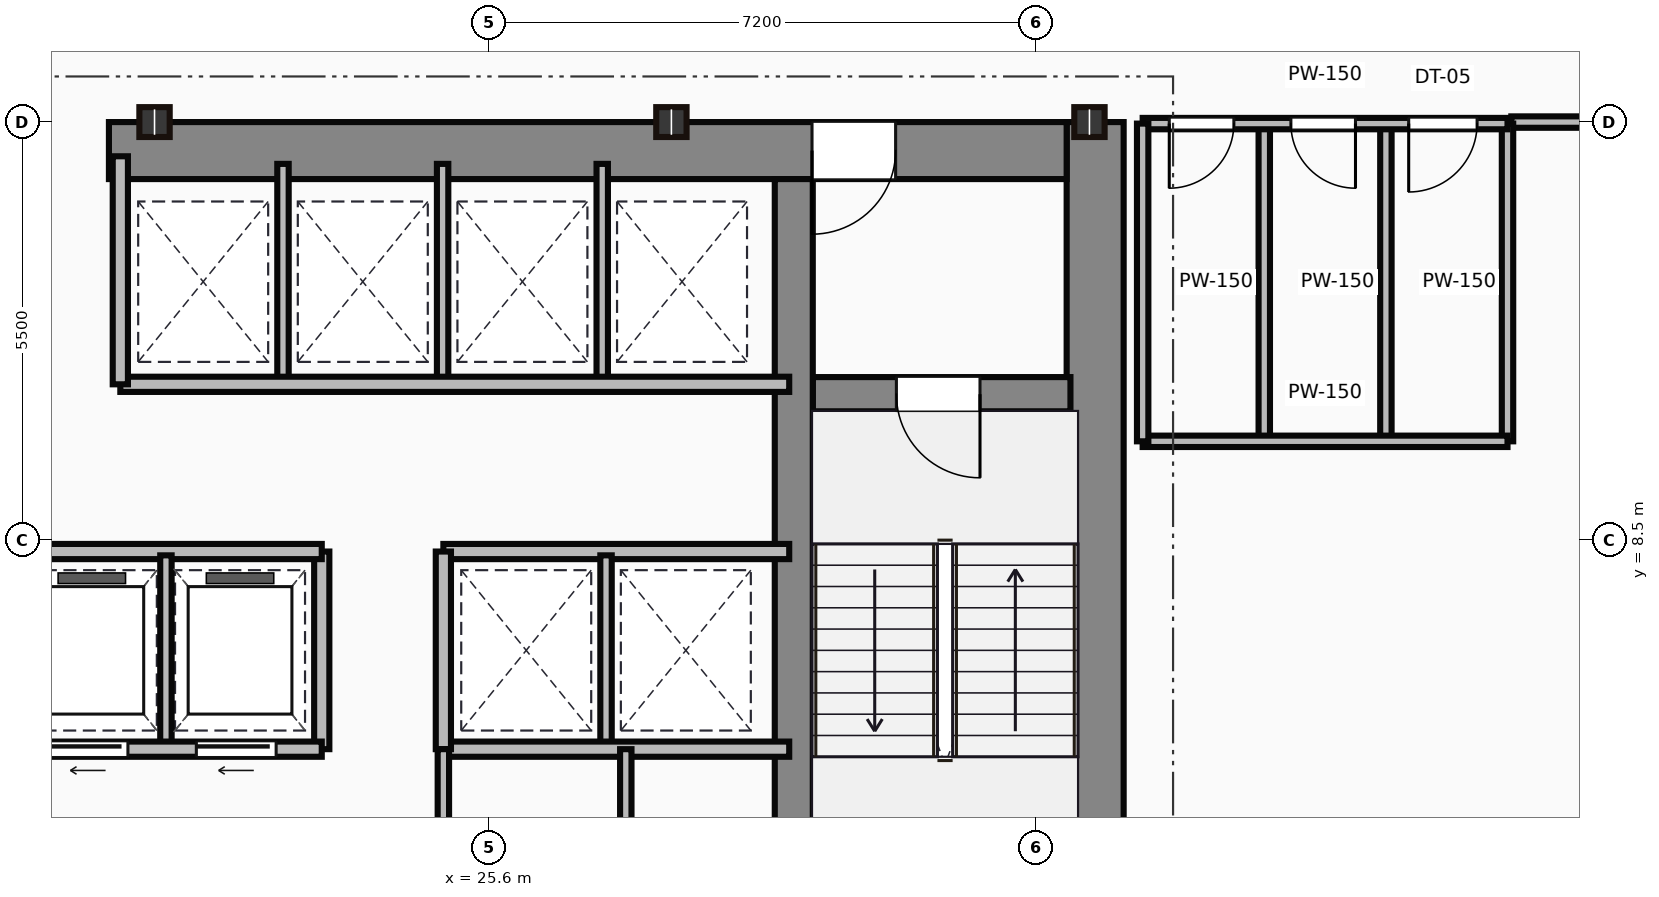
"""IFC4 building model, lengths in metres.
Left out: names, types, materials, properties, quantities, classifications, styles, units other than length and angle.
Written with IfcOpenShell. Run it as: python <this file> out.ifc"""

import sys

from ifc_helpers import new_model, si_unit, direction, frame, frame_2d, origin, origin_2d, place, context, subcontext, project, spatial, rectangle, i_section, extrude, source, transform, mapped, element, fill, save


model = new_model("IFC4")
c1 = context("Model", 3, precision=1e-05, world=origin(), true_north=direction((0.0, 1.0)))
c2 = subcontext(c1, "Body", "Model", "MODEL_VIEW")
j1 = project(units=[si_unit("LENGTHUNIT", "METRE"), si_unit("PLANEANGLEUNIT", "RADIAN")], contexts=[c1])
p1 = place(None, origin())
s1 = spatial("IfcSite", under=j1, at=p1, CompositionType="ELEMENT")
p2 = place(p1, origin())
s2 = spatial("IfcBuilding", under=s1, at=p2, CompositionType="ELEMENT")
p3 = place(p2, frame((0.0, 0.0, 99.6)))
s3 = spatial("IfcBuildingStorey", under=s2, at=p3, CompositionType="ELEMENT", Elevation=99.6)
m1 = source(origin(), c2, "Body", "SweptSolid", [
    extrude(rectangle(XDim=13.1, YDim=0.75, at=frame_2d((6.55, 0.0))), origin(), (0.0, 0.0, 1.0), 3.65),
])
p4 = place(p3, frame((33.575, 0.9, 0.0), z_axis=(0.0, 0.0, 1.0), x_axis=(0.0, 1.0, 0.0)))
e1 = element("IfcWall", 1, at=p4, inside=s3, PredefinedType="SHEAR", context=c2, shape_type="MappedRepresentation", body=[
    mapped(m1, transform((0.0, 0.0, 0.0))),
])
m2 = source(origin(), c2, "Body", "SweptSolid", [
    extrude(rectangle(XDim=12.6, YDim=0.75, at=frame_2d((6.3, 0.0))), origin(), (0.0, 0.0, 1.0), 3.65),
])
p5 = place(p3, frame((20.6, 13.625, 0.0), z_axis=(0.0, 0.0, 1.0), x_axis=(1.0, 0.0, 0.0)))
e2 = element("IfcWall", 2, at=p5, inside=s3, PredefinedType="SHEAR", context=c2, shape_type="MappedRepresentation", body=[
    mapped(m2, transform((0.0, 0.0, 0.0))),
])
p6 = place(p5, frame((9.25, 0.0, 0.0)))
e3 = element("IfcOpeningElement", 3, at=p6, cuts=e2, PredefinedType="OPENING", context=c2, shape_type="SweptSolid", body=[
    extrude(rectangle(XDim=1.1, YDim=2.15, at=frame_2d((0.55, 1.075))), frame((0.0, 0.385, 0.0), z_axis=(0.0, -1.0, 0.0), x_axis=(1.0, 0.0, 0.0)), (0.0, 0.0, 1.0), 0.77),
])
m3 = source(origin(), c2, "Body", "SweptSolid", [
    extrude(rectangle(XDim=12.35, YDim=0.5, at=frame_2d((6.175, 0.0))), origin(), (0.0, 0.0, 1.0), 3.65),
])
p7 = place(p3, frame((29.61, 0.9, 0.0), z_axis=(0.0, 0.0, 1.0), x_axis=(0.0, 1.0, 0.0)))
e4 = element("IfcWall", 4, at=p7, inside=s3, PredefinedType="SHEAR", context=c2, shape_type="MappedRepresentation", body=[
    mapped(m3, transform((0.0, 0.0, 0.0))),
])
m4 = source(origin(), c2, "Body", "SweptSolid", [
    extrude(rectangle(XDim=3.39, YDim=0.45, at=frame_2d((1.695, 0.0))), origin(), (0.0, 0.0, 1.0), 3.65),
])
p8 = place(p3, frame((29.86, 10.42, 0.0), z_axis=(0.0, 0.0, 1.0), x_axis=(1.0, 0.0, 0.0)))
e5 = element("IfcWall", 5, at=p8, inside=s3, PredefinedType="SHEAR", context=c2, shape_type="MappedRepresentation", body=[
    mapped(m4, transform((0.0, 0.0, 0.0))),
])
p9 = place(p8, frame((1.1, 0.0, 0.0)))
e6 = element("IfcOpeningElement", 6, at=p9, cuts=e5, PredefinedType="OPENING", context=c2, shape_type="SweptSolid", body=[
    extrude(rectangle(XDim=1.1, YDim=2.15, at=frame_2d((0.55, 1.075))), frame((0.0, 0.235, 0.0), z_axis=(0.0, -1.0, 0.0), x_axis=(1.0, 0.0, 0.0)), (0.0, 0.0, 1.0), 0.47),
])
m5 = source(origin(), c2, "Body", "SweptSolid", [
    extrude(i_section(OverallWidth=0.399, OverallDepth=0.393, WebThickness=0.023, FlangeThickness=0.037, at=origin_2d()), origin(), (0.0, 0.0, 1.0), 3.65),
])
for number, where, z_axis, x_axis in (
    (7, (21.2, 14.0, 0.0), (0.0, 0.0, 1.0), (1.0, 0.0, 0.0)),
    (8, (28.0, 14.0, 0.0), (0.0, 0.0, 1.0), (1.0, 0.0, 0.0)),
    (9, (33.5, 14.0, 0.0), (0.0, 0.0, 1.0), (1.0, 0.0, 0.0)),
):
    element("IfcColumn", number, at=place(p3, frame(where, z_axis=z_axis, x_axis=x_axis)), inside=s3, PredefinedType="COLUMN", context=c2, shape_type="MappedRepresentation", body=[
        mapped(m5, transform((0.0, 0.0, 0.0))),
    ])
m6 = source(origin(), c2, "Body", "SweptSolid", [
    extrude(rectangle(XDim=11.85, YDim=0.2, at=frame_2d((5.925, 0.0))), origin(), (0.0, 0.0, 1.0), 3.4),
])
p10 = place(p3, frame((11.55, 5.75, 0.0), z_axis=(0.0, 0.0, 1.0), x_axis=(1.0, 0.0, 0.0)))
e10 = element("IfcWall", 10, at=p10, inside=s3, PredefinedType="PARTITIONING", context=c2, shape_type="MappedRepresentation", body=[
    mapped(m6, transform((0.0, 0.0, 0.0))),
])
p11 = place(p10, frame((0.45, 0.0, 0.0)))
e11 = element("IfcOpeningElement", 11, at=p11, cuts=e10, PredefinedType="OPENING", context=c2, shape_type="SweptSolid", body=[
    extrude(rectangle(XDim=1.05, YDim=2.15, at=frame_2d((0.525, 1.075))), frame((0.0, 0.11, 0.0), z_axis=(0.0, -1.0, 0.0), x_axis=(1.0, 0.0, 0.0)), (0.0, 0.0, 1.0), 0.22),
])
p12 = place(p10, frame((2.4, 0.0, 0.0)))
e12 = element("IfcOpeningElement", 12, at=p12, cuts=e10, PredefinedType="OPENING", context=c2, shape_type="SweptSolid", body=[
    extrude(rectangle(XDim=1.05, YDim=2.15, at=frame_2d((0.525, 1.075))), frame((0.0, 0.11, 0.0), z_axis=(0.0, -1.0, 0.0), x_axis=(1.0, 0.0, 0.0)), (0.0, 0.0, 1.0), 0.22),
])
p13 = place(p10, frame((4.35, 0.0, 0.0)))
e13 = element("IfcOpeningElement", 13, at=p13, cuts=e10, PredefinedType="OPENING", context=c2, shape_type="SweptSolid", body=[
    extrude(rectangle(XDim=1.05, YDim=2.15, at=frame_2d((0.525, 1.075))), frame((0.0, 0.11, 0.0), z_axis=(0.0, -1.0, 0.0), x_axis=(1.0, 0.0, 0.0)), (0.0, 0.0, 1.0), 0.22),
])
p14 = place(p10, frame((6.3, 0.0, 0.0)))
e14 = element("IfcOpeningElement", 14, at=p14, cuts=e10, PredefinedType="OPENING", context=c2, shape_type="SweptSolid", body=[
    extrude(rectangle(XDim=1.05, YDim=2.15, at=frame_2d((0.525, 1.075))), frame((0.0, 0.11, 0.0), z_axis=(0.0, -1.0, 0.0), x_axis=(1.0, 0.0, 0.0)), (0.0, 0.0, 1.0), 0.22),
])
p15 = place(p10, frame((8.25, 0.0, 0.0)))
e15 = element("IfcOpeningElement", 15, at=p15, cuts=e10, PredefinedType="OPENING", context=c2, shape_type="SweptSolid", body=[
    extrude(rectangle(XDim=1.05, YDim=2.15, at=frame_2d((0.525, 1.075))), frame((0.0, 0.11, 0.0), z_axis=(0.0, -1.0, 0.0), x_axis=(1.0, 0.0, 0.0)), (0.0, 0.0, 1.0), 0.22),
])
p16 = place(p10, frame((10.2, 0.0, 0.0)))
e16 = element("IfcOpeningElement", 16, at=p16, cuts=e10, PredefinedType="OPENING", context=c2, shape_type="SweptSolid", body=[
    extrude(rectangle(XDim=1.05, YDim=2.15, at=frame_2d((0.525, 1.075))), frame((0.0, 0.11, 0.0), z_axis=(0.0, -1.0, 0.0), x_axis=(1.0, 0.0, 0.0)), (0.0, 0.0, 1.0), 0.22),
])
p17 = place(p3, frame((11.55, 8.35, 0.0), z_axis=(0.0, 0.0, 1.0), x_axis=(1.0, 0.0, 0.0)))
e17 = element("IfcWall", 17, at=p17, inside=s3, PredefinedType="PARTITIONING", context=c2, shape_type="MappedRepresentation", body=[
    mapped(m6, transform((0.0, 0.0, 0.0))),
])
m7 = source(origin(), c2, "Body", "SweptSolid", [
    extrude(rectangle(XDim=2.6, YDim=0.2, at=frame_2d((1.3, 0.0))), origin(), (0.0, 0.0, 1.0), 3.4),
])
p18 = place(p3, frame((23.4, 5.75, 0.0), z_axis=(0.0, 0.0, 1.0), x_axis=(0.0, 1.0, 0.0)))
e18 = element("IfcWall", 18, at=p18, inside=s3, PredefinedType="PARTITIONING", context=c2, shape_type="MappedRepresentation", body=[
    mapped(m7, transform((0.0, 0.0, 0.0))),
])
m8 = source(origin(), c2, "Body", "SweptSolid", [
    extrude(rectangle(XDim=2.5, YDim=0.15, at=frame_2d((1.25, 0.0))), origin(), (0.0, 0.0, 1.0), 3.4),
])
p19 = place(p3, frame((21.35, 5.8, 0.0), z_axis=(0.0, 0.0, 1.0), x_axis=(0.0, 1.0, 0.0)))
e19 = element("IfcWall", 19, at=p19, inside=s3, PredefinedType="PARTITIONING", context=c2, shape_type="MappedRepresentation", body=[
    mapped(m8, transform((0.0, 0.0, 0.0))),
])
m9 = source(origin(), c2, "Body", "SweptSolid", [
    extrude(rectangle(XDim=8.8, YDim=0.2, at=frame_2d((4.4, 0.0))), origin(), (0.0, 0.0, 1.0), 3.4),
])
p20 = place(p3, frame((20.75, 10.55, 0.0), z_axis=(0.0, 0.0, 1.0), x_axis=(1.0, 0.0, 0.0)))
e20 = element("IfcWall", 20, at=p20, inside=s3, PredefinedType="PARTITIONING", context=c2, shape_type="MappedRepresentation", body=[
    mapped(m9, transform((0.0, 0.0, 0.0))),
])
m10 = source(origin(), c2, "Body", "SweptSolid", [
    extrude(rectangle(XDim=3.0, YDim=0.2, at=frame_2d((1.5, 0.0))), origin(), (0.0, 0.0, 1.0), 3.4),
])
p21 = place(p3, frame((20.75, 10.55, 0.0), z_axis=(0.0, 0.0, 1.0), x_axis=(0.0, 1.0, 0.0)))
e21 = element("IfcWall", 21, at=p21, inside=s3, PredefinedType="PARTITIONING", context=c2, shape_type="MappedRepresentation", body=[
    mapped(m10, transform((0.0, 0.0, 0.0))),
])
m11 = source(origin(), c2, "Body", "SweptSolid", [
    extrude(rectangle(XDim=2.85, YDim=0.15, at=frame_2d((1.425, 0.0))), origin(), (0.0, 0.0, 1.0), 3.4),
])
for number, where, z_axis, x_axis in (
    (22, (22.89, 10.6, 0.0), (0.0, 0.0, 1.0), (0.0, 1.0, 0.0)),
    (23, (24.99, 10.6, 0.0), (0.0, 0.0, 1.0), (0.0, 1.0, 0.0)),
    (24, (27.09, 10.6, 0.0), (0.0, 0.0, 1.0), (0.0, 1.0, 0.0)),
):
    element("IfcWall", number, at=place(p3, frame(where, z_axis=z_axis, x_axis=x_axis)), inside=s3, PredefinedType="PARTITIONING", context=c2, shape_type="MappedRepresentation", body=[
        mapped(m11, transform((0.0, 0.0, 0.0))),
    ])
m12 = source(origin(), c2, "Body", "SweptSolid", [
    extrude(rectangle(XDim=4.55, YDim=0.2, at=frame_2d((2.275, 0.0))), origin(), (0.0, 0.0, 1.0), 3.4),
])
for number, where, z_axis, x_axis in (
    (25, (25.0, 8.35, 0.0), (0.0, 0.0, 1.0), (1.0, 0.0, 0.0)),
    (26, (25.0, 5.75, 0.0), (0.0, 0.0, 1.0), (1.0, 0.0, 0.0)),
):
    element("IfcWall", number, at=place(p3, frame(where, z_axis=z_axis, x_axis=x_axis)), inside=s3, PredefinedType="PARTITIONING", context=c2, shape_type="MappedRepresentation", body=[
        mapped(m12, transform((0.0, 0.0, 0.0))),
    ])
p22 = place(p3, frame((25.0, 5.75, 0.0), z_axis=(0.0, 0.0, 1.0), x_axis=(0.0, 1.0, 0.0)))
e27 = element("IfcWall", 27, at=p22, inside=s3, PredefinedType="PARTITIONING", context=c2, shape_type="MappedRepresentation", body=[
    mapped(m7, transform((0.0, 0.0, 0.0))),
])
p23 = place(p3, frame((27.14, 5.8, 0.0), z_axis=(0.0, 0.0, 1.0), x_axis=(0.0, 1.0, 0.0)))
e28 = element("IfcWall", 28, at=p23, inside=s3, PredefinedType="PARTITIONING", context=c2, shape_type="MappedRepresentation", body=[
    mapped(m8, transform((0.0, 0.0, 0.0))),
])
m13 = source(origin(), c2, "Body", "SweptSolid", [
    extrude(rectangle(XDim=4.9, YDim=0.15, at=frame_2d((2.45, 0.0))), origin(), (0.0, 0.0, 1.0), 3.4),
])
p24 = place(p3, frame((25.0, 0.85, 0.0), z_axis=(0.0, 0.0, 1.0), x_axis=(0.0, 1.0, 0.0)))
e29 = element("IfcWall", 29, at=p24, inside=s3, PredefinedType="PARTITIONING", context=c2, shape_type="MappedRepresentation", body=[
    mapped(m13, transform((0.0, 0.0, 0.0))),
])
p25 = place(p24, frame((2.5, 0.0, 0.0)))
e30 = element("IfcOpeningElement", 30, at=p25, cuts=e29, PredefinedType="OPENING", context=c2, shape_type="SweptSolid", body=[
    extrude(rectangle(XDim=0.95, YDim=2.15, at=frame_2d((0.475, 1.075))), frame((0.0, 0.085, 0.0), z_axis=(0.0, -1.0, 0.0), x_axis=(1.0, 0.0, 0.0)), (0.0, 0.0, 1.0), 0.17),
])
m14 = source(origin(), c2, "Body", "SweptSolid", [
    extrude(rectangle(XDim=3.4, YDim=0.15, at=frame_2d((1.7, 0.0))), origin(), (0.0, 0.0, 1.0), 3.4),
])
p26 = place(p3, frame((27.4, 2.35, 0.0), z_axis=(0.0, 0.0, 1.0), x_axis=(0.0, 1.0, 0.0)))
e31 = element("IfcWall", 31, at=p26, inside=s3, PredefinedType="PARTITIONING", context=c2, shape_type="MappedRepresentation", body=[
    mapped(m14, transform((0.0, 0.0, 0.0))),
])
p27 = place(p26, frame((1.1, 0.0, 0.0)))
e32 = element("IfcOpeningElement", 32, at=p27, cuts=e31, PredefinedType="OPENING", context=c2, shape_type="SweptSolid", body=[
    extrude(rectangle(XDim=0.85, YDim=2.1, at=frame_2d((0.425, 1.05))), frame((0.0, 0.085, 0.0), z_axis=(0.0, -1.0, 0.0), x_axis=(1.0, 0.0, 0.0)), (0.0, 0.0, 1.0), 0.17),
])
m15 = source(origin(), c2, "Body", "SweptSolid", [
    extrude(rectangle(XDim=4.8, YDim=0.15, at=frame_2d((2.4, 0.0))), origin(), (0.0, 0.0, 1.0), 2.702),
])
p28 = place(p3, frame((34.2, 13.98, 0.0), z_axis=(0.0, 0.0, 1.0), x_axis=(1.0, 0.0, 0.0)))
e33 = element("IfcWall", 33, at=p28, inside=s3, PredefinedType="PARTITIONING", context=c2, shape_type="MappedRepresentation", body=[
    mapped(m15, transform((0.0, 0.0, 0.0))),
])
p29 = place(p28, frame((0.35, 0.0, 0.0)))
e34 = element("IfcOpeningElement", 34, at=p29, cuts=e33, PredefinedType="OPENING", context=c2, shape_type="SweptSolid", body=[
    extrude(rectangle(XDim=0.85, YDim=2.1, at=frame_2d((0.425, 1.05))), frame((0.0, 0.085, 0.0), z_axis=(0.0, -1.0, 0.0), x_axis=(1.0, 0.0, 0.0)), (0.0, 0.0, 1.0), 0.17),
])
p30 = place(p28, frame((1.95, 0.0, 0.0)))
e35 = element("IfcOpeningElement", 35, at=p30, cuts=e33, PredefinedType="OPENING", context=c2, shape_type="SweptSolid", body=[
    extrude(rectangle(XDim=0.85, YDim=2.1, at=frame_2d((0.425, 1.05))), frame((0.0, 0.085, 0.0), z_axis=(0.0, -1.0, 0.0), x_axis=(1.0, 0.0, 0.0)), (0.0, 0.0, 1.0), 0.17),
])
p31 = place(p28, frame((3.5, 0.0, 0.0)))
e36 = element("IfcOpeningElement", 36, at=p31, cuts=e33, PredefinedType="OPENING", context=c2, shape_type="SweptSolid", body=[
    extrude(rectangle(XDim=0.9, YDim=2.1, at=frame_2d((0.45, 1.05))), frame((0.0, 0.085, 0.0), z_axis=(0.0, -1.0, 0.0), x_axis=(1.0, 0.0, 0.0)), (0.0, 0.0, 1.0), 0.17),
])
m16 = source(origin(), c2, "Body", "SweptSolid", [
    extrude(rectangle(XDim=4.8, YDim=0.15, at=frame_2d((2.4, 0.0))), origin(), (0.0, 0.0, 1.0), 3.4),
])
p32 = place(p3, frame((34.2, 9.8, 0.0), z_axis=(0.0, 0.0, 1.0), x_axis=(1.0, 0.0, 0.0)))
e37 = element("IfcWall", 37, at=p32, inside=s3, PredefinedType="PARTITIONING", context=c2, shape_type="MappedRepresentation", body=[
    mapped(m16, transform((0.0, 0.0, 0.0))),
])
m17 = source(origin(), c2, "Body", "SweptSolid", [
    extrude(rectangle(XDim=4.18, YDim=0.15, at=frame_2d((2.09, 0.0))), origin(), (0.0, 0.0, 1.0), 3.4),
])
for number, where, z_axis, x_axis in (
    (38, (39.0, 9.8, 0.0), (0.0, 0.0, 1.0), (0.0, 1.0, 0.0)),
    (39, (34.2, 9.8, 0.0), (0.0, 0.0, 1.0), (0.0, 1.0, 0.0)),
    (40, (35.8, 9.8, 0.0), (0.0, 0.0, 1.0), (0.0, 1.0, 0.0)),
    (41, (37.4, 9.8, 0.0), (0.0, 0.0, 1.0), (0.0, 1.0, 0.0)),
):
    element("IfcWall", number, at=place(p3, frame(where, z_axis=z_axis, x_axis=x_axis)), inside=s3, PredefinedType="PARTITIONING", context=c2, shape_type="MappedRepresentation", body=[
        mapped(m17, transform((0.0, 0.0, 0.0))),
    ])
m18 = source(origin(), c2, "Body", "SweptSolid", [
    extrude(rectangle(XDim=1.75, YDim=0.15, at=frame_2d((0.875, 0.0))), origin(), (0.0, 0.0, 1.0), 2.702),
])
p33 = place(p3, frame((40.8, 14.0, 0.0), z_axis=(0.0, 0.0, 1.0), x_axis=(-1.0, 0.0, 0.0)))
e42 = element("IfcWall", 42, at=p33, inside=s3, PredefinedType="PARTITIONING", context=c2, shape_type="MappedRepresentation", body=[
    mapped(m18, transform((0.0, 0.0, 0.0))),
])
m19 = source(origin(), c2, "Body", "SweptSolid", [
    extrude(rectangle(XDim=1.1, YDim=2.15, at=frame_2d((0.55, 1.075))), frame((0.0, 0.025, 0.0), z_axis=(0.0, -1.0, 0.0), x_axis=(1.0, 0.0, 0.0)), (0.0, 0.0, 1.0), 0.05),
])
p34 = place(p9, frame((1.1, 0.0, 0.0), z_axis=(0.0, 0.0, 1.0), x_axis=(-1.0, 0.0, 0.0)))
e43 = element("IfcDoor", 43, at=p34, inside=s3, OperationType="SINGLE_SWING_RIGHT", PredefinedType="DOOR", context=c2, shape_type="MappedRepresentation", body=[
    mapped(m19, transform((0.0, 0.0, 0.0))),
])
fill(e6, e43)
p35 = place(p6, origin())
e44 = element("IfcDoor", 44, at=p35, inside=s3, OperationType="SINGLE_SWING_LEFT", PredefinedType="DOOR", context=c2, shape_type="MappedRepresentation", body=[
    mapped(m19, transform((0.0, 0.0, 0.0))),
])
fill(e3, e44)
m20 = source(origin(), c2, "Body", "SweptSolid", [
    extrude(rectangle(XDim=1.05, YDim=2.15, at=frame_2d((0.525, 1.075))), frame((0.0, 0.025, 0.0), z_axis=(0.0, -1.0, 0.0), x_axis=(1.0, 0.0, 0.0)), (0.0, 0.0, 1.0), 0.05),
])
p36 = place(p15, frame((1.05, 0.0, 0.0), z_axis=(0.0, 0.0, 1.0), x_axis=(-1.0, 0.0, 0.0)))
e45 = element("IfcDoor", 45, at=p36, inside=s3, OperationType="SLIDING_TO_LEFT", PredefinedType="DOOR", context=c2, shape_type="MappedRepresentation", body=[
    mapped(m20, transform((0.0, 0.0, 0.0))),
])
fill(e15, e45)
p37 = place(p16, frame((1.05, 0.0, 0.0), z_axis=(0.0, 0.0, 1.0), x_axis=(-1.0, 0.0, 0.0)))
e46 = element("IfcDoor", 46, at=p37, inside=s3, OperationType="SLIDING_TO_LEFT", PredefinedType="DOOR", context=c2, shape_type="MappedRepresentation", body=[
    mapped(m20, transform((0.0, 0.0, 0.0))),
])
fill(e16, e46)
m21 = source(origin(), c2, "Body", "SweptSolid", [
    extrude(rectangle(XDim=0.85, YDim=2.1, at=frame_2d((0.425, 1.05))), frame((0.0, 0.025, 0.0), z_axis=(0.0, -1.0, 0.0), x_axis=(1.0, 0.0, 0.0)), (0.0, 0.0, 1.0), 0.05),
])
p38 = place(p29, frame((0.85, 0.0, 0.0), z_axis=(0.0, 0.0, 1.0), x_axis=(-1.0, 0.0, 0.0)))
e47 = element("IfcDoor", 47, at=p38, inside=s3, OperationType="SINGLE_SWING_LEFT", PredefinedType="DOOR", context=c2, shape_type="MappedRepresentation", body=[
    mapped(m21, transform((0.0, 0.0, 0.0))),
])
fill(e34, e47)
p39 = place(p30, frame((0.85, 0.0, 0.0), z_axis=(0.0, 0.0, 1.0), x_axis=(-1.0, 0.0, 0.0)))
e48 = element("IfcDoor", 48, at=p39, inside=s3, OperationType="SINGLE_SWING_RIGHT", PredefinedType="DOOR", context=c2, shape_type="MappedRepresentation", body=[
    mapped(m21, transform((0.0, 0.0, 0.0))),
])
fill(e35, e48)
m22 = source(origin(), c2, "Body", "SweptSolid", [
    extrude(rectangle(XDim=0.9, YDim=2.1, at=frame_2d((0.45, 1.05))), frame((0.0, 0.025, 0.0), z_axis=(0.0, -1.0, 0.0), x_axis=(1.0, 0.0, 0.0)), (0.0, 0.0, 1.0), 0.05),
])
p40 = place(p31, frame((0.9, 0.0, 0.0), z_axis=(0.0, 0.0, 1.0), x_axis=(-1.0, 0.0, 0.0)))
e49 = element("IfcDoor", 49, at=p40, inside=s3, OperationType="SINGLE_SWING_LEFT", PredefinedType="DOOR", context=c2, shape_type="MappedRepresentation", body=[
    mapped(m22, transform((0.0, 0.0, 0.0))),
])
fill(e36, e49)
save(model, sys.argv[1])
